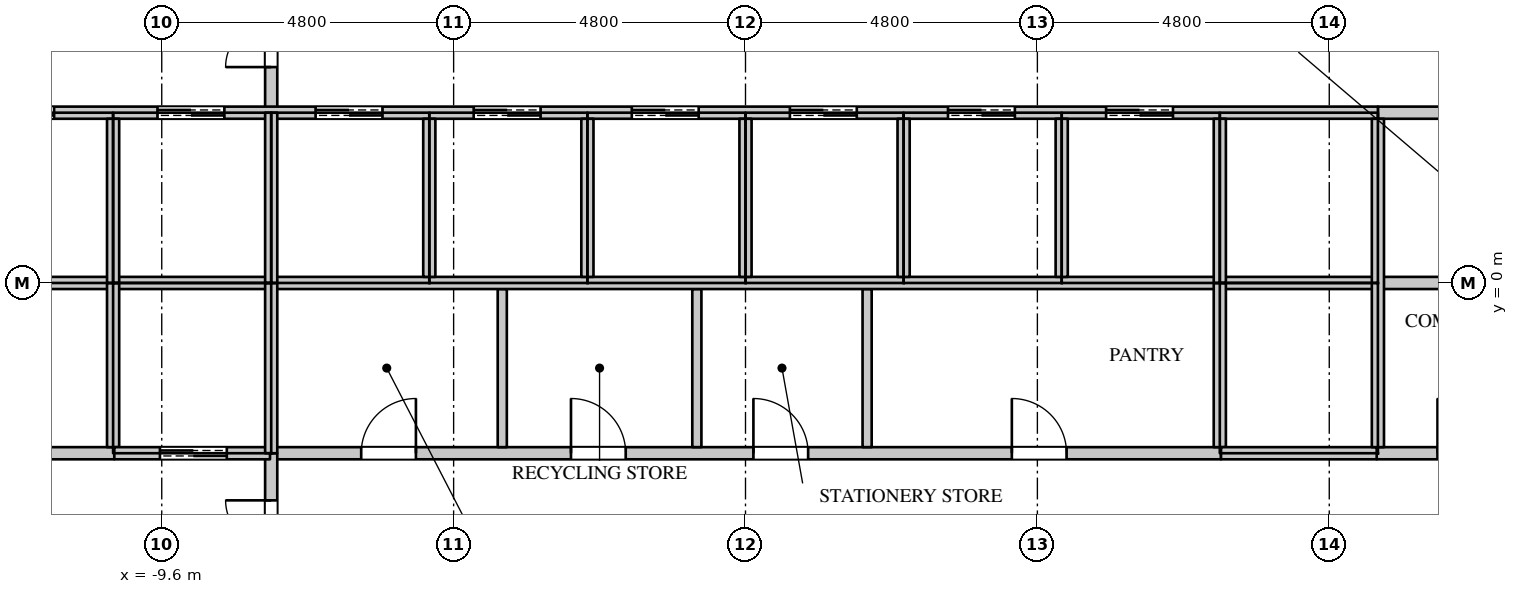
"""IFC4 building model, lengths in metres.
Left out: names, types, materials, properties, quantities, classifications, styles, units other than length and angle.
Written with IfcOpenShell. Run it as: python <this file> out.ifc"""

import sys

from ifc_helpers import new_model, si_unit, direction, frame, frame_2d, origin, place, context, subcontext, project, spatial, rectangle, extrude, element, fill, save


model = new_model("IFC4")
c1 = context("Model", 3, precision=1e-05, world=origin(), true_north=direction((0.0, 1.0)))
c2 = subcontext(c1, "Body", "Model", "MODEL_VIEW")
j1 = project(units=[si_unit("LENGTHUNIT", "METRE"), si_unit("PLANEANGLEUNIT", "RADIAN")], contexts=[c1])
p1 = place(None, origin())
s1 = spatial("IfcSite", under=j1, at=p1, CompositionType="ELEMENT")
p2 = place(p1, origin())
s2 = spatial("IfcBuilding", under=s1, at=p2, CompositionType="ELEMENT")
p3 = place(p2, frame((0.0, 0.0, 59.1)))
s3 = spatial("IfcBuildingStorey", under=s2, at=p3, CompositionType="ELEMENT", Elevation=59.1)
p4 = place(p3, frame((-7.82, -2.8, 0.0), z_axis=(0.0, 0.0, 1.0), x_axis=(1.0, 0.0, 0.0)))
e1 = element("IfcWall", 1, at=p4, inside=s3, PredefinedType="PARTITIONING", context=c2, shape_type="SweptSolid", body=[
    extrude(rectangle(XDim=15.64, YDim=0.2, at=frame_2d((7.82, 0.0))), origin(), (0.0, 0.0, 1.0), 3.95),
])
p5 = place(p4, frame((1.5, 0.0, 0.0)))
e2 = element("IfcOpeningElement", 2, at=p5, cuts=e1, PredefinedType="OPENING", context=c2, shape_type="SweptSolid", body=[
    extrude(rectangle(XDim=0.9, YDim=2.2, at=frame_2d((0.45, 1.1))), frame((0.0, 0.11, 0.0), z_axis=(0.0, -1.0, 0.0), x_axis=(1.0, 0.0, 0.0)), (0.0, 0.0, 1.0), 0.22),
])
p6 = place(p4, frame((4.95, 0.0, 0.0)))
e3 = element("IfcOpeningElement", 3, at=p6, cuts=e1, PredefinedType="OPENING", context=c2, shape_type="SweptSolid", body=[
    extrude(rectangle(XDim=0.9, YDim=2.2, at=frame_2d((0.45, 1.1))), frame((0.0, 0.11, 0.0), z_axis=(0.0, -1.0, 0.0), x_axis=(1.0, 0.0, 0.0)), (0.0, 0.0, 1.0), 0.22),
])
p7 = place(p4, frame((7.95, 0.0, 0.0)))
e4 = element("IfcOpeningElement", 4, at=p7, cuts=e1, PredefinedType="OPENING", context=c2, shape_type="SweptSolid", body=[
    extrude(rectangle(XDim=0.9, YDim=2.2, at=frame_2d((0.45, 1.1))), frame((0.0, 0.11, 0.0), z_axis=(0.0, -1.0, 0.0), x_axis=(1.0, 0.0, 0.0)), (0.0, 0.0, 1.0), 0.22),
])
p8 = place(p4, frame((12.2, 0.0, 0.0)))
e5 = element("IfcOpeningElement", 5, at=p8, cuts=e1, PredefinedType="OPENING", context=c2, shape_type="SweptSolid", body=[
    extrude(rectangle(XDim=0.9, YDim=2.2, at=frame_2d((0.45, 1.1))), frame((0.0, 0.11, 0.0), z_axis=(0.0, -1.0, 0.0), x_axis=(1.0, 0.0, 0.0)), (0.0, 0.0, 1.0), 0.22),
])
p9 = place(p3, frame((-7.8, -8.075, 0.0), z_axis=(0.0, 0.0, 1.0), x_axis=(0.0, 1.0, 0.0)))
e6 = element("IfcWall", 6, at=p9, inside=s3, PredefinedType="PARTITIONING", context=c2, shape_type="SweptSolid", body=[
    extrude(rectangle(XDim=5.275, YDim=0.2, at=frame_2d((2.637, 0.0))), origin(), (0.0, 0.0, 1.0), 3.95),
])
p10 = place(p9, frame((3.0, 0.0, 0.0)))
e7 = element("IfcOpeningElement", 7, at=p10, cuts=e6, PredefinedType="OPENING", context=c2, shape_type="SweptSolid", body=[
    extrude(rectangle(XDim=1.5, YDim=2.4, at=frame_2d((0.75, 1.2))), frame((0.0, 0.11, 0.0), z_axis=(0.0, -1.0, 0.0), x_axis=(1.0, 0.0, 0.0)), (0.0, 0.0, 1.0), 0.22),
])
p11 = place(p3, frame((-7.8, 2.8, 0.0), z_axis=(0.0, 0.0, 1.0), x_axis=(0.0, 1.0, 0.0)))
e8 = element("IfcWall", 8, at=p11, inside=s3, PredefinedType="PARTITIONING", context=c2, shape_type="SweptSolid", body=[
    extrude(rectangle(XDim=5.275, YDim=0.2, at=frame_2d((2.637, 0.0))), origin(), (0.0, 0.0, 1.0), 3.95),
])
p12 = place(p11, frame((0.75, 0.0, 0.0)))
e9 = element("IfcOpeningElement", 9, at=p12, cuts=e8, PredefinedType="OPENING", context=c2, shape_type="SweptSolid", body=[
    extrude(rectangle(XDim=1.5, YDim=2.4, at=frame_2d((0.75, 1.2))), frame((0.0, 0.11, 0.0), z_axis=(0.0, -1.0, 0.0), x_axis=(1.0, 0.0, 0.0)), (0.0, 0.0, 1.0), 0.22),
])
for number, where, z_axis, x_axis in (
    (10, (-4.0, -2.7, 0.0), (0.0, 0.0, 1.0), (0.0, 1.0, 0.0)),
    (11, (-0.8, -2.7, 0.0), (0.0, 0.0, 1.0), (0.0, 1.0, 0.0)),
    (12, (2.0, -2.7, 0.0), (0.0, 0.0, 1.0), (0.0, 1.0, 0.0)),
):
    element("IfcWall", number, at=place(p3, frame(where, z_axis=z_axis, x_axis=x_axis)), inside=s3, PredefinedType="PARTITIONING", context=c2, shape_type="SweptSolid", body=[
        extrude(rectangle(XDim=2.6, YDim=0.15, at=frame_2d((1.3, 0.0))), origin(), (0.0, 0.0, 1.0), 3.95),
    ])
p13 = place(p3, frame((-13.37, -2.8, 0.0), z_axis=(0.0, 0.0, 1.0), x_axis=(1.0, 0.0, 0.0)))
e13 = element("IfcWall", 13, at=p13, inside=s3, PredefinedType="PARTITIONING", context=c2, shape_type="SweptSolid", body=[
    extrude(rectangle(XDim=2.99, YDim=0.2, at=frame_2d((1.495, 0.0))), origin(), (0.0, 0.0, 1.0), 3.95),
])
p14 = place(p13, frame((1.2, 0.0, 0.0)))
e14 = element("IfcOpeningElement", 14, at=p14, cuts=e13, PredefinedType="OPENING", context=c2, shape_type="SweptSolid", body=[
    extrude(rectangle(XDim=0.6, YDim=2.0, at=frame_2d((0.3, 1.0))), frame((0.0, 0.11, 0.0), z_axis=(0.0, -1.0, 0.0), x_axis=(1.0, 0.0, 0.0)), (0.0, 0.0, 1.0), 0.22),
])
p15 = place(p3, frame((10.38, -2.8, 0.0), z_axis=(0.0, 0.0, 1.0), x_axis=(1.0, 0.0, 0.0)))
e15 = element("IfcWall", 15, at=p15, inside=s3, PredefinedType="PARTITIONING", context=c2, shape_type="SweptSolid", body=[
    extrude(rectangle(XDim=2.99, YDim=0.2, at=frame_2d((1.495, 0.0))), origin(), (0.0, 0.0, 1.0), 3.95),
])
p16 = place(p15, frame((1.0, 0.0, 0.0)))
e16 = element("IfcOpeningElement", 16, at=p16, cuts=e15, PredefinedType="OPENING", context=c2, shape_type="SweptSolid", body=[
    extrude(rectangle(XDim=0.9, YDim=2.2, at=frame_2d((0.45, 1.1))), frame((0.0, 0.11, 0.0), z_axis=(0.0, -1.0, 0.0), x_axis=(1.0, 0.0, 0.0)), (0.0, 0.0, 1.0), 0.22),
])
p17 = place(p3, frame((10.4, 2.8, 0.0), z_axis=(0.0, 0.0, 1.0), x_axis=(1.0, 0.0, 0.0)))
e17 = element("IfcWall", 17, at=p17, inside=s3, PredefinedType="PARTITIONING", context=c2, shape_type="SweptSolid", body=[
    extrude(rectangle(XDim=2.97, YDim=0.2, at=frame_2d((1.485, 0.0))), origin(), (0.0, 0.0, 1.0), 3.95),
])
p18 = place(p17, frame((1.2, 0.0, 0.0)))
e18 = element("IfcOpeningElement", 18, at=p18, cuts=e17, PredefinedType="OPENING", context=c2, shape_type="SweptSolid", body=[
    extrude(rectangle(XDim=0.6, YDim=2.0, at=frame_2d((0.3, 1.0))), frame((0.0, 0.11, 0.0), z_axis=(0.0, -1.0, 0.0), x_axis=(1.0, 0.0, 0.0)), (0.0, 0.0, 1.0), 0.22),
])
p19 = place(p3, frame((10.4, 0.0, 0.0), z_axis=(0.0, 0.0, 1.0), x_axis=(1.0, 0.0, 0.0)))
e19 = element("IfcWall", 19, at=p19, inside=s3, PredefinedType="PARTITIONING", context=c2, shape_type="SweptSolid", body=[
    extrude(rectangle(XDim=2.97, YDim=0.2, at=frame_2d((1.485, 0.0))), origin(), (0.0, 0.0, 1.0), 3.95),
])
p20 = place(p3, frame((-13.37, 0.0, 0.0), z_axis=(0.0, 0.0, 1.0), x_axis=(1.0, 0.0, 0.0)))
e20 = element("IfcWall", 20, at=p20, inside=s3, PredefinedType="PARTITIONING", context=c2, shape_type="SweptSolid", body=[
    extrude(rectangle(XDim=23.77, YDim=0.2, at=frame_2d((11.885, 0.0))), origin(), (0.0, 0.0, 1.0), 3.95),
])
p21 = place(p3, frame((-13.37, 2.8, 0.0), z_axis=(0.0, 0.0, 1.0), x_axis=(1.0, 0.0, 0.0)))
e21 = element("IfcWall", 21, at=p21, inside=s3, PredefinedType="PARTITIONING", context=c2, shape_type="SweptSolid", body=[
    extrude(rectangle(XDim=23.77, YDim=0.2, at=frame_2d((11.885, 0.0))), origin(), (0.0, 0.0, 1.0), 3.95),
])
p22 = place(p21, frame((0.9, 0.0, 0.0)))
e22 = element("IfcOpeningElement", 22, at=p22, cuts=e21, PredefinedType="OPENING", context=c2, shape_type="SweptSolid", body=[
    extrude(rectangle(XDim=1.1, YDim=2.2, at=frame_2d((0.55, 1.1))), frame((0.0, 0.11, 0.0), z_axis=(0.0, -1.0, 0.0), x_axis=(1.0, 0.0, 0.0)), (0.0, 0.0, 1.0), 0.22),
])
p23 = place(p21, frame((3.7, 0.0, 0.0)))
e23 = element("IfcOpeningElement", 23, at=p23, cuts=e21, PredefinedType="OPENING", context=c2, shape_type="SweptSolid", body=[
    extrude(rectangle(XDim=1.1, YDim=2.2, at=frame_2d((0.55, 1.1))), frame((0.0, 0.11, 0.0), z_axis=(0.0, -1.0, 0.0), x_axis=(1.0, 0.0, 0.0)), (0.0, 0.0, 1.0), 0.22),
])
p24 = place(p21, frame((6.3, 0.0, 0.0)))
e24 = element("IfcOpeningElement", 24, at=p24, cuts=e21, PredefinedType="OPENING", context=c2, shape_type="SweptSolid", body=[
    extrude(rectangle(XDim=1.1, YDim=2.2, at=frame_2d((0.55, 1.1))), frame((0.0, 0.11, 0.0), z_axis=(0.0, -1.0, 0.0), x_axis=(1.0, 0.0, 0.0)), (0.0, 0.0, 1.0), 0.22),
])
p25 = place(p21, frame((8.9, 0.0, 0.0)))
e25 = element("IfcOpeningElement", 25, at=p25, cuts=e21, PredefinedType="OPENING", context=c2, shape_type="SweptSolid", body=[
    extrude(rectangle(XDim=1.1, YDim=2.2, at=frame_2d((0.55, 1.1))), frame((0.0, 0.11, 0.0), z_axis=(0.0, -1.0, 0.0), x_axis=(1.0, 0.0, 0.0)), (0.0, 0.0, 1.0), 0.22),
])
p26 = place(p21, frame((11.5, 0.0, 0.0)))
e26 = element("IfcOpeningElement", 26, at=p26, cuts=e21, PredefinedType="OPENING", context=c2, shape_type="SweptSolid", body=[
    extrude(rectangle(XDim=1.1, YDim=2.2, at=frame_2d((0.55, 1.1))), frame((0.0, 0.11, 0.0), z_axis=(0.0, -1.0, 0.0), x_axis=(1.0, 0.0, 0.0)), (0.0, 0.0, 1.0), 0.22),
])
p27 = place(p21, frame((14.1, 0.0, 0.0)))
e27 = element("IfcOpeningElement", 27, at=p27, cuts=e21, PredefinedType="OPENING", context=c2, shape_type="SweptSolid", body=[
    extrude(rectangle(XDim=1.1, YDim=2.2, at=frame_2d((0.55, 1.1))), frame((0.0, 0.11, 0.0), z_axis=(0.0, -1.0, 0.0), x_axis=(1.0, 0.0, 0.0)), (0.0, 0.0, 1.0), 0.22),
])
p28 = place(p21, frame((16.7, 0.0, 0.0)))
e28 = element("IfcOpeningElement", 28, at=p28, cuts=e21, PredefinedType="OPENING", context=c2, shape_type="SweptSolid", body=[
    extrude(rectangle(XDim=1.1, YDim=2.2, at=frame_2d((0.55, 1.1))), frame((0.0, 0.11, 0.0), z_axis=(0.0, -1.0, 0.0), x_axis=(1.0, 0.0, 0.0)), (0.0, 0.0, 1.0), 0.22),
])
p29 = place(p21, frame((19.3, 0.0, 0.0)))
e29 = element("IfcOpeningElement", 29, at=p29, cuts=e21, PredefinedType="OPENING", context=c2, shape_type="SweptSolid", body=[
    extrude(rectangle(XDim=1.1, YDim=2.2, at=frame_2d((0.55, 1.1))), frame((0.0, 0.11, 0.0), z_axis=(0.0, -1.0, 0.0), x_axis=(1.0, 0.0, 0.0)), (0.0, 0.0, 1.0), 0.22),
])
p30 = place(p3, frame((-10.4, -2.7, 0.0), z_axis=(0.0, 0.0, 1.0), x_axis=(0.0, 1.0, 0.0)))
e30 = element("IfcWall", 30, at=p30, inside=s3, PredefinedType="PARTITIONING", context=c2, shape_type="SweptSolid", body=[
    extrude(rectangle(XDim=2.7, YDim=0.2, at=frame_2d((1.35, 0.0))), origin(), (0.0, 0.0, 1.0), 3.95),
])
p31 = place(p3, frame((-10.38, -2.8, 0.0), z_axis=(0.0, 0.0, 1.0), x_axis=(1.0, 0.0, 0.0)))
e31 = element("IfcWall", 31, at=p31, inside=s3, PredefinedType="PARTITIONING", context=c2, shape_type="SweptSolid", body=[
    extrude(rectangle(XDim=2.56, YDim=0.2, at=frame_2d((1.28, 0.0))), origin(), (0.0, 0.0, 1.0), 3.95),
])
p32 = place(p31, frame((0.75, 0.0, 0.0)))
e32 = element("IfcOpeningElement", 32, at=p32, cuts=e31, PredefinedType="OPENING", context=c2, shape_type="SweptSolid", body=[
    extrude(rectangle(XDim=1.1, YDim=2.2, at=frame_2d((0.55, 1.1))), frame((0.0, 0.11, 0.0), z_axis=(0.0, -1.0, 0.0), x_axis=(1.0, 0.0, 0.0)), (0.0, 0.0, 1.0), 0.22),
])
p33 = place(p3, frame((-10.4, 0.0, 0.0), z_axis=(0.0, 0.0, 1.0), x_axis=(0.0, 1.0, 0.0)))
e33 = element("IfcWall", 33, at=p33, inside=s3, PredefinedType="PARTITIONING", context=c2, shape_type="SweptSolid", body=[
    extrude(rectangle(XDim=2.7, YDim=0.2, at=frame_2d((1.35, 0.0))), origin(), (0.0, 0.0, 1.0), 3.95),
])
for number, where, z_axis, x_axis in (
    (34, (-7.8, -2.8, 0.0), (0.0, 0.0, 1.0), (0.0, 1.0, 0.0)),
    (35, (-7.8, 0.0, 0.0), (0.0, 0.0, 1.0), (0.0, 1.0, 0.0)),
):
    element("IfcWall", number, at=place(p3, frame(where, z_axis=z_axis, x_axis=x_axis)), inside=s3, PredefinedType="PARTITIONING", context=c2, shape_type="SweptSolid", body=[
        extrude(rectangle(XDim=2.8, YDim=0.2, at=frame_2d((1.4, 0.0))), origin(), (0.0, 0.0, 1.0), 3.95),
    ])
for number, where, z_axis, x_axis in (
    (36, (-5.2, 0.1, 0.0), (0.0, 0.0, 1.0), (0.0, 1.0, 0.0)),
    (37, (-2.6, 0.1, 0.0), (0.0, 0.0, 1.0), (0.0, 1.0, 0.0)),
    (38, (0.0, 0.1, 0.0), (0.0, 0.0, 1.0), (0.0, 1.0, 0.0)),
    (39, (2.6, 0.1, 0.0), (0.0, 0.0, 1.0), (0.0, 1.0, 0.0)),
    (40, (5.2, 0.1, 0.0), (0.0, 0.0, 1.0), (0.0, 1.0, 0.0)),
):
    element("IfcWall", number, at=place(p3, frame(where, z_axis=z_axis, x_axis=x_axis)), inside=s3, PredefinedType="PARTITIONING", context=c2, shape_type="SweptSolid", body=[
        extrude(rectangle(XDim=2.6, YDim=0.2, at=frame_2d((1.3, 0.0))), origin(), (0.0, 0.0, 1.0), 3.95),
    ])
p34 = place(p3, frame((7.8, -2.7, 0.0), z_axis=(0.0, 0.0, 1.0), x_axis=(0.0, 1.0, 0.0)))
e41 = element("IfcWall", 41, at=p34, inside=s3, PredefinedType="PARTITIONING", context=c2, shape_type="SweptSolid", body=[
    extrude(rectangle(XDim=2.7, YDim=0.2, at=frame_2d((1.35, 0.0))), origin(), (0.0, 0.0, 1.0), 3.95),
])
p35 = place(p3, frame((7.82, -2.8, 0.0), z_axis=(0.0, 0.0, 1.0), x_axis=(1.0, 0.0, 0.0)))
e42 = element("IfcWall", 42, at=p35, inside=s3, PredefinedType="PARTITIONING", context=c2, shape_type="SweptSolid", body=[
    extrude(rectangle(XDim=2.56, YDim=0.2, at=frame_2d((1.28, 0.0))), origin(), (0.0, 0.0, 1.0), 3.95),
])
p36 = place(p3, frame((7.8, 0.0, 0.0), z_axis=(0.0, 0.0, 1.0), x_axis=(0.0, 1.0, 0.0)))
e43 = element("IfcWall", 43, at=p36, inside=s3, PredefinedType="PARTITIONING", context=c2, shape_type="SweptSolid", body=[
    extrude(rectangle(XDim=2.7, YDim=0.2, at=frame_2d((1.35, 0.0))), origin(), (0.0, 0.0, 1.0), 3.95),
])
p37 = place(p3, frame((10.4, -2.7, 0.0), z_axis=(0.0, 0.0, 1.0), x_axis=(0.0, 1.0, 0.0)))
e44 = element("IfcWall", 44, at=p37, inside=s3, PredefinedType="PARTITIONING", context=c2, shape_type="SweptSolid", body=[
    extrude(rectangle(XDim=5.4, YDim=0.2, at=frame_2d((2.7, 0.0))), origin(), (0.0, 0.0, 1.0), 3.95),
])
p38 = place(p16, origin())
e45 = element("IfcDoor", 45, at=p38, inside=s3, OperationType="SINGLE_SWING_LEFT", PredefinedType="DOOR", context=c2, shape_type="SweptSolid", body=[
    extrude(rectangle(XDim=0.9, YDim=2.2, at=frame_2d((0.45, 1.1))), frame((0.0, 0.025, 0.0), z_axis=(0.0, -1.0, 0.0), x_axis=(1.0, 0.0, 0.0)), (0.0, 0.0, 1.0), 0.05),
])
fill(e16, e45)
p39 = place(p5, origin())
e46 = element("IfcDoor", 46, at=p39, inside=s3, OperationType="SINGLE_SWING_RIGHT", PredefinedType="DOOR", context=c2, shape_type="SweptSolid", body=[
    extrude(rectangle(XDim=0.9, YDim=2.2, at=frame_2d((0.45, 1.1))), frame((0.0, 0.025, 0.0), z_axis=(0.0, -1.0, 0.0), x_axis=(1.0, 0.0, 0.0)), (0.0, 0.0, 1.0), 0.05),
])
fill(e2, e46)
p40 = place(p6, origin())
e47 = element("IfcDoor", 47, at=p40, inside=s3, OperationType="SINGLE_SWING_LEFT", PredefinedType="DOOR", context=c2, shape_type="SweptSolid", body=[
    extrude(rectangle(XDim=0.9, YDim=2.2, at=frame_2d((0.45, 1.1))), frame((0.0, 0.025, 0.0), z_axis=(0.0, -1.0, 0.0), x_axis=(1.0, 0.0, 0.0)), (0.0, 0.0, 1.0), 0.05),
])
fill(e3, e47)
p41 = place(p7, origin())
e48 = element("IfcDoor", 48, at=p41, inside=s3, OperationType="SINGLE_SWING_LEFT", PredefinedType="DOOR", context=c2, shape_type="SweptSolid", body=[
    extrude(rectangle(XDim=0.9, YDim=2.2, at=frame_2d((0.45, 1.1))), frame((0.0, 0.025, 0.0), z_axis=(0.0, -1.0, 0.0), x_axis=(1.0, 0.0, 0.0)), (0.0, 0.0, 1.0), 0.05),
])
fill(e4, e48)
p42 = place(p8, origin())
e49 = element("IfcDoor", 49, at=p42, inside=s3, OperationType="SINGLE_SWING_LEFT", PredefinedType="DOOR", context=c2, shape_type="SweptSolid", body=[
    extrude(rectangle(XDim=0.9, YDim=2.2, at=frame_2d((0.45, 1.1))), frame((0.0, 0.025, 0.0), z_axis=(0.0, -1.0, 0.0), x_axis=(1.0, 0.0, 0.0)), (0.0, 0.0, 1.0), 0.05),
])
fill(e5, e49)
p43 = place(p22, origin())
e50 = element("IfcDoor", 50, at=p43, inside=s3, OperationType="DOUBLE_DOOR_SLIDING", PredefinedType="DOOR", context=c2, shape_type="SweptSolid", body=[
    extrude(rectangle(XDim=1.1, YDim=2.2, at=frame_2d((0.55, 1.1))), frame((0.0, 0.025, 0.0), z_axis=(0.0, -1.0, 0.0), x_axis=(1.0, 0.0, 0.0)), (0.0, 0.0, 1.0), 0.05),
])
fill(e22, e50)
p44 = place(p23, origin())
e51 = element("IfcDoor", 51, at=p44, inside=s3, OperationType="DOUBLE_DOOR_SLIDING", PredefinedType="DOOR", context=c2, shape_type="SweptSolid", body=[
    extrude(rectangle(XDim=1.1, YDim=2.2, at=frame_2d((0.55, 1.1))), frame((0.0, 0.025, 0.0), z_axis=(0.0, -1.0, 0.0), x_axis=(1.0, 0.0, 0.0)), (0.0, 0.0, 1.0), 0.05),
])
fill(e23, e51)
p45 = place(p32, origin())
e52 = element("IfcDoor", 52, at=p45, inside=s3, OperationType="DOUBLE_DOOR_SLIDING", PredefinedType="DOOR", context=c2, shape_type="SweptSolid", body=[
    extrude(rectangle(XDim=1.1, YDim=2.2, at=frame_2d((0.55, 1.1))), frame((0.0, 0.025, 0.0), z_axis=(0.0, -1.0, 0.0), x_axis=(1.0, 0.0, 0.0)), (0.0, 0.0, 1.0), 0.05),
])
fill(e32, e52)
p46 = place(p24, origin())
e53 = element("IfcDoor", 53, at=p46, inside=s3, OperationType="DOUBLE_DOOR_SLIDING", PredefinedType="DOOR", context=c2, shape_type="SweptSolid", body=[
    extrude(rectangle(XDim=1.1, YDim=2.2, at=frame_2d((0.55, 1.1))), frame((0.0, 0.025, 0.0), z_axis=(0.0, -1.0, 0.0), x_axis=(1.0, 0.0, 0.0)), (0.0, 0.0, 1.0), 0.05),
])
fill(e24, e53)
p47 = place(p25, origin())
e54 = element("IfcDoor", 54, at=p47, inside=s3, OperationType="DOUBLE_DOOR_SLIDING", PredefinedType="DOOR", context=c2, shape_type="SweptSolid", body=[
    extrude(rectangle(XDim=1.1, YDim=2.2, at=frame_2d((0.55, 1.1))), frame((0.0, 0.025, 0.0), z_axis=(0.0, -1.0, 0.0), x_axis=(1.0, 0.0, 0.0)), (0.0, 0.0, 1.0), 0.05),
])
fill(e25, e54)
p48 = place(p26, origin())
e55 = element("IfcDoor", 55, at=p48, inside=s3, OperationType="DOUBLE_DOOR_SLIDING", PredefinedType="DOOR", context=c2, shape_type="SweptSolid", body=[
    extrude(rectangle(XDim=1.1, YDim=2.2, at=frame_2d((0.55, 1.1))), frame((0.0, 0.025, 0.0), z_axis=(0.0, -1.0, 0.0), x_axis=(1.0, 0.0, 0.0)), (0.0, 0.0, 1.0), 0.05),
])
fill(e26, e55)
p49 = place(p27, origin())
e56 = element("IfcDoor", 56, at=p49, inside=s3, OperationType="DOUBLE_DOOR_SLIDING", PredefinedType="DOOR", context=c2, shape_type="SweptSolid", body=[
    extrude(rectangle(XDim=1.1, YDim=2.2, at=frame_2d((0.55, 1.1))), frame((0.0, 0.025, 0.0), z_axis=(0.0, -1.0, 0.0), x_axis=(1.0, 0.0, 0.0)), (0.0, 0.0, 1.0), 0.05),
])
fill(e27, e56)
p50 = place(p28, origin())
e57 = element("IfcDoor", 57, at=p50, inside=s3, OperationType="DOUBLE_DOOR_SLIDING", PredefinedType="DOOR", context=c2, shape_type="SweptSolid", body=[
    extrude(rectangle(XDim=1.1, YDim=2.2, at=frame_2d((0.55, 1.1))), frame((0.0, 0.025, 0.0), z_axis=(0.0, -1.0, 0.0), x_axis=(1.0, 0.0, 0.0)), (0.0, 0.0, 1.0), 0.05),
])
fill(e28, e57)
p51 = place(p29, origin())
e58 = element("IfcDoor", 58, at=p51, inside=s3, OperationType="DOUBLE_DOOR_SLIDING", PredefinedType="DOOR", context=c2, shape_type="SweptSolid", body=[
    extrude(rectangle(XDim=1.1, YDim=2.2, at=frame_2d((0.55, 1.1))), frame((0.0, 0.025, 0.0), z_axis=(0.0, -1.0, 0.0), x_axis=(1.0, 0.0, 0.0)), (0.0, 0.0, 1.0), 0.05),
])
fill(e29, e58)
p52 = place(p12, origin())
e59 = element("IfcDoor", 59, at=p52, inside=s3, OperationType="DOUBLE_DOOR_SINGLE_SWING", PredefinedType="DOOR", context=c2, shape_type="SweptSolid", body=[
    extrude(rectangle(XDim=1.5, YDim=2.4, at=frame_2d((0.75, 1.2))), frame((0.0, 0.025, 0.0), z_axis=(0.0, -1.0, 0.0), x_axis=(1.0, 0.0, 0.0)), (0.0, 0.0, 1.0), 0.05),
])
fill(e9, e59)
p53 = place(p10, origin())
e60 = element("IfcDoor", 60, at=p53, inside=s3, OperationType="DOUBLE_DOOR_SINGLE_SWING", PredefinedType="DOOR", context=c2, shape_type="SweptSolid", body=[
    extrude(rectangle(XDim=1.5, YDim=2.4, at=frame_2d((0.75, 1.2))), frame((0.0, 0.025, 0.0), z_axis=(0.0, -1.0, 0.0), x_axis=(1.0, 0.0, 0.0)), (0.0, 0.0, 1.0), 0.05),
])
fill(e7, e60)
save(model, sys.argv[1])
